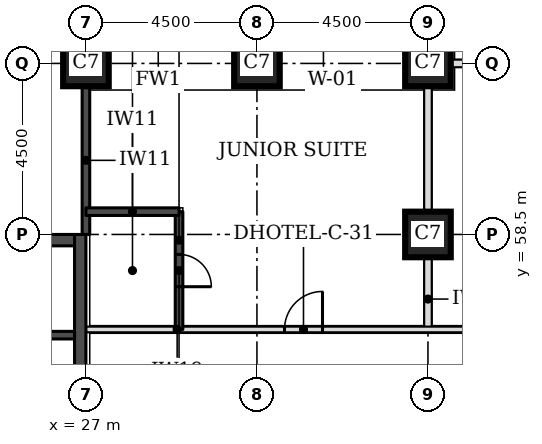
"""IFC4 building model, lengths in metres.
Left out: names, types, materials, properties, quantities, classifications, styles, units other than length and angle.
Written with IfcOpenShell. Run it as: python <this file> out.ifc"""

import sys

from ifc_helpers import new_model, si_unit, direction, frame, frame_2d, origin, origin_2d, place, context, subcontext, project, spatial, rectangle, extrude, element, fill, save


model = new_model("IFC4")
c1 = context("Model", 3, precision=1e-05, world=origin(), true_north=direction((0.0, 1.0)))
c2 = subcontext(c1, "Body", "Model", "MODEL_VIEW")
j1 = project(units=[si_unit("LENGTHUNIT", "METRE"), si_unit("PLANEANGLEUNIT", "RADIAN")], contexts=[c1])
p1 = place(None, origin())
s1 = spatial("IfcSite", under=j1, at=p1, CompositionType="ELEMENT")
p2 = place(p1, origin())
s2 = spatial("IfcBuilding", under=s1, at=p2, CompositionType="ELEMENT")
p3 = place(p2, frame((0.0, 0.0, 33.0)))
s3 = spatial("IfcBuildingStorey", under=s2, at=p3, CompositionType="ELEMENT", Elevation=33.0)
for number, where, z_axis, x_axis in (
    (1, (36.0, 58.5, 0.0), (0.0, 0.0, 1.0), (1.0, 0.0, 0.0)),
    (2, (27.0, 63.0, 0.0), (0.0, 0.0, 1.0), (1.0, 0.0, 0.0)),
    (3, (31.5, 63.0, 0.0), (0.0, 0.0, 1.0), (1.0, 0.0, 0.0)),
    (4, (36.0, 63.0, 0.0), (0.0, 0.0, 1.0), (1.0, 0.0, 0.0)),
):
    element("IfcColumn", number, at=place(p3, frame(where, z_axis=z_axis, x_axis=x_axis)), inside=s3, PredefinedType="COLUMN", context=c2, shape_type="SweptSolid", body=[
        extrude(rectangle(XDim=1.2, YDim=1.2, at=origin_2d()), origin(), (0.0, 0.0, 1.0), 3.3),
    ])
p4 = place(p3, frame((18.3, 58.35, 0.0), z_axis=(0.0, 0.0, 1.0), x_axis=(1.0, 0.0, 0.0)))
e5 = element("IfcWall", 5, at=p4, inside=s3, PredefinedType="SHEAR", context=c2, shape_type="SweptSolid", body=[
    extrude(rectangle(XDim=8.4, YDim=0.3, at=frame_2d((4.2, 0.0))), origin(), (0.0, 0.0, 1.0), 3.3),
])
p5 = place(p4, frame((3.3, 0.0, 0.0)))
e6 = element("IfcOpeningElement", 6, at=p5, cuts=e5, PredefinedType="OPENING", context=c2, shape_type="SweptSolid", body=[
    extrude(rectangle(XDim=1.8, YDim=2.1, at=frame_2d((0.9, 1.05))), frame((0.0, 0.16, 0.0), z_axis=(0.0, -1.0, 0.0), x_axis=(1.0, 0.0, 0.0)), (0.0, 0.0, 1.0), 0.32),
])
p6 = place(p3, frame((26.85, 49.5, 0.0), z_axis=(0.0, 0.0, 1.0), x_axis=(0.0, 1.0, 0.0)))
e7 = element("IfcWall", 7, at=p6, inside=s3, PredefinedType="SHEAR", context=c2, shape_type="SweptSolid", body=[
    extrude(rectangle(XDim=9.0, YDim=0.3, at=frame_2d((4.5, 0.0))), origin(), (0.0, 0.0, 1.0), 3.3),
])
p7 = place(p3, frame((36.0, 56.0, 0.0), z_axis=(0.0, 0.0, 1.0), x_axis=(0.0, 1.0, 0.0)))
e8 = element("IfcWall", 8, at=p7, inside=s3, PredefinedType="PARTITIONING", context=c2, shape_type="SweptSolid", body=[
    extrude(rectangle(XDim=6.4, YDim=0.2, at=frame_2d((3.2, 0.0))), origin(), (0.0, 0.0, 1.0), 2.33),
])
p8 = place(p3, frame((36.6, 63.0, 0.0), z_axis=(0.0, 0.0, 1.0), x_axis=(1.0, 0.0, 0.0)))
e9 = element("IfcWall", 9, at=p8, inside=s3, PredefinedType="PARTITIONING", context=c2, shape_type="SweptSolid", body=[
    extrude(rectangle(XDim=6.4, YDim=0.2, at=frame_2d((3.2, 0.0))), origin(), (0.0, 0.0, 1.0), 3.08),
])
p9 = place(p3, frame((27.0, 56.0, 0.0), z_axis=(0.0, 0.0, 1.0), x_axis=(1.0, 0.0, 0.0)))
e10 = element("IfcWall", 10, at=p9, inside=s3, PredefinedType="PARTITIONING", context=c2, shape_type="SweptSolid", body=[
    extrude(rectangle(XDim=16.0, YDim=0.15, at=frame_2d((8.0, 0.0))), origin(), (0.0, 0.0, 1.0), 3.08),
])
p10 = place(p9, frame((5.225, 0.0, 0.0)))
e11 = element("IfcOpeningElement", 11, at=p10, cuts=e10, PredefinedType="OPENING", context=c2, shape_type="SweptSolid", body=[
    extrude(rectangle(XDim=1.0, YDim=2.1, at=frame_2d((0.5, 1.05))), frame((0.0, 0.085, 0.0), z_axis=(0.0, -1.0, 0.0), x_axis=(1.0, 0.0, 0.0)), (0.0, 0.0, 1.0), 0.17),
])
p11 = place(p3, frame((27.0, 58.5, 0.0), z_axis=(0.0, 0.0, 1.0), x_axis=(0.0, 1.0, 0.0)))
e12 = element("IfcWall", 12, at=p11, inside=s3, PredefinedType="SOLIDWALL", context=c2, shape_type="SweptSolid", body=[
    extrude(rectangle(XDim=3.9, YDim=0.2, at=frame_2d((1.95, 0.0))), origin(), (0.0, 0.0, 1.0), 3.08),
])
p12 = place(p3, frame((29.45, 56.0, 0.0), z_axis=(0.0, 0.0, 1.0), x_axis=(0.0, 1.0, 0.0)))
e13 = element("IfcWall", 13, at=p12, inside=s3, PredefinedType="SOLIDWALL", context=c2, shape_type="SweptSolid", body=[
    extrude(rectangle(XDim=3.1, YDim=0.2, at=frame_2d((1.55, 0.0))), origin(), (0.0, 0.0, 1.0), 3.08),
])
p13 = place(p12, frame((1.125, 0.0, 0.0)))
e14 = element("IfcOpeningElement", 14, at=p13, cuts=e13, PredefinedType="OPENING", context=c2, shape_type="SweptSolid", body=[
    extrude(rectangle(XDim=0.85, YDim=2.1, at=frame_2d((0.425, 1.05))), frame((0.0, 0.11, 0.0), z_axis=(0.0, -1.0, 0.0), x_axis=(1.0, 0.0, 0.0)), (0.0, 0.0, 1.0), 0.22),
])
p14 = place(p3, frame((27.0, 59.1, 0.0), z_axis=(0.0, 0.0, 1.0), x_axis=(1.0, 0.0, 0.0)))
e15 = element("IfcWall", 15, at=p14, inside=s3, PredefinedType="SOLIDWALL", context=c2, shape_type="SweptSolid", body=[
    extrude(rectangle(XDim=2.45, YDim=0.2, at=frame_2d((1.225, 0.0))), origin(), (0.0, 0.0, 1.0), 3.08),
])
p15 = place(p3, frame((23.2, 55.85, 0.0), z_axis=(0.0, 0.0, 1.0), x_axis=(1.0, 0.0, 0.0)))
e16 = element("IfcWall", 16, at=p15, inside=s3, PredefinedType="SOLIDWALL", context=c2, shape_type="SweptSolid", body=[
    extrude(rectangle(XDim=3.5, YDim=0.2, at=frame_2d((1.75, 0.0))), origin(), (0.0, 0.0, 1.0), 3.08),
])
p16 = place(p15, frame((1.2, 0.0, 0.0)))
e17 = element("IfcOpeningElement", 17, at=p16, cuts=e16, PredefinedType="OPENING", context=c2, shape_type="SweptSolid", body=[
    extrude(rectangle(XDim=1.1, YDim=2.1, at=frame_2d((0.55, 1.05))), frame((0.0, 0.11, 0.0), z_axis=(0.0, -1.0, 0.0), x_axis=(1.0, 0.0, 0.0)), (0.0, 0.0, 1.0), 0.22),
])
p17 = place(p10, origin())
e18 = element("IfcDoor", 18, at=p17, inside=s3, OperationType="SINGLE_SWING_RIGHT", PredefinedType="DOOR", context=c2, shape_type="SweptSolid", body=[
    extrude(rectangle(XDim=1.0, YDim=2.1, at=frame_2d((0.5, 1.05))), frame((0.0, 0.025, 0.0), z_axis=(0.0, -1.0, 0.0), x_axis=(1.0, 0.0, 0.0)), (0.0, 0.0, 1.0), 0.05),
])
fill(e11, e18)
p18 = place(p13, frame((0.85, 0.0, 0.0), z_axis=(0.0, 0.0, 1.0), x_axis=(-1.0, 0.0, 0.0)))
e19 = element("IfcDoor", 19, at=p18, inside=s3, OperationType="SINGLE_SWING_RIGHT", PredefinedType="DOOR", context=c2, shape_type="SweptSolid", body=[
    extrude(rectangle(XDim=0.85, YDim=2.1, at=frame_2d((0.425, 1.05))), frame((0.0, 0.025, 0.0), z_axis=(0.0, -1.0, 0.0), x_axis=(1.0, 0.0, 0.0)), (0.0, 0.0, 1.0), 0.05),
])
fill(e14, e19)
save(model, sys.argv[1])
